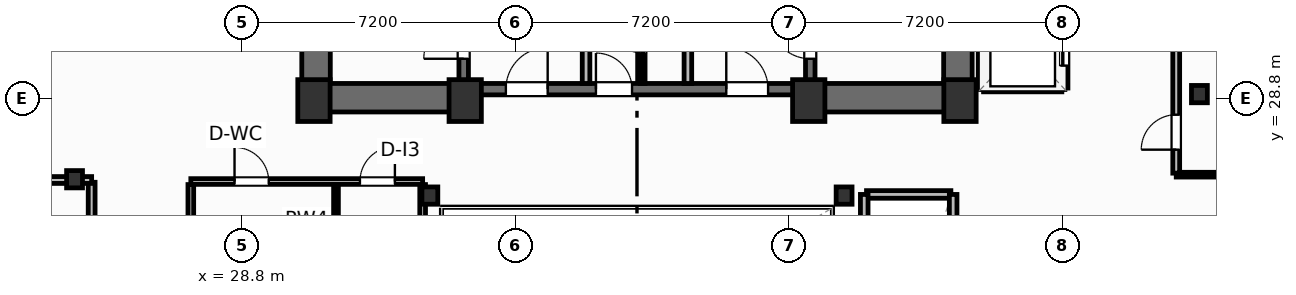
"""IFC4 building model, lengths in metres.
Left out: names, types, materials, properties, quantities, classifications, styles, units other than length and angle.
Written with IfcOpenShell. Run it as: python <this file> out.ifc"""

import sys

from ifc_helpers import new_model, si_unit, direction, frame, frame_2d, origin, origin_2d, place, context, subcontext, project, spatial, rectangle, i_section, extrude, element, fill, save


model = new_model("IFC4")
c1 = context("Model", 3, precision=1e-05, world=origin(), true_north=direction((0.0, 1.0)))
c2 = subcontext(c1, "Body", "Model", "MODEL_VIEW")
j1 = project(units=[si_unit("LENGTHUNIT", "METRE"), si_unit("PLANEANGLEUNIT", "RADIAN")], contexts=[c1])
p1 = place(None, origin())
s1 = spatial("IfcSite", under=j1, at=p1, CompositionType="ELEMENT")
p2 = place(p1, origin())
s2 = spatial("IfcBuilding", under=s1, at=p2, CompositionType="ELEMENT")
p3 = place(p2, frame((0.0, 0.0, 147.6)))
s3 = spatial("IfcBuildingStorey", under=s2, at=p3, CompositionType="ELEMENT", Elevation=147.6)
for number, where, z_axis, x_axis in (
    (1, (30.7, 28.75, 0.0), (0.0, 0.0, 1.0), (1.0, 0.0, 0.0)),
    (2, (34.68, 28.75, 0.0), (0.0, 0.0, 1.0), (1.0, 0.0, 0.0)),
    (3, (43.72, 28.75, 0.0), (0.0, 0.0, 1.0), (1.0, 0.0, 0.0)),
    (4, (47.7, 28.75, 0.0), (0.0, 0.0, 1.0), (1.0, 0.0, 0.0)),
):
    element("IfcColumn", number, at=place(p3, frame(where, z_axis=z_axis, x_axis=x_axis)), inside=s3, PredefinedType="COLUMN", context=c2, shape_type="SweptSolid", body=[
        extrude(rectangle(XDim=0.85, YDim=1.1, at=origin_2d()), origin(), (0.0, 0.0, 1.0), 3.7),
    ])
for number, where, z_axis, x_axis in (
    (5, (33.75, 26.25, 0.0), (0.0, 0.0, 1.0), (1.0, 0.0, 0.0)),
    (6, (44.65, 26.25, 0.0), (0.0, 0.0, 1.0), (1.0, 0.0, 0.0)),
    (7, (24.4, 26.68, 0.0), (0.0, 0.0, 1.0), (1.0, 0.0, 0.0)),
    (8, (54.0, 28.92, 0.0), (0.0, 0.0, 1.0), (1.0, 0.0, 0.0)),
):
    element("IfcColumn", number, at=place(p3, frame(where, z_axis=z_axis, x_axis=x_axis)), inside=s3, PredefinedType="COLUMN", context=c2, shape_type="SweptSolid", body=[
        extrude(i_section(OverallWidth=0.418, OverallDepth=0.455, WebThickness=0.042, FlangeThickness=0.068, FilletRadius=0.025, at=origin_2d()), origin(), (0.0, 0.0, 1.0), 3.7),
    ])
for number, where, z_axis, x_axis in (
    (9, (30.755, 29.2, 0.0), (0.0, 0.0, 1.0), (0.0, 1.0, 0.0)),
    (10, (47.645, 29.2, 0.0), (0.0, 0.0, 1.0), (0.0, 1.0, 0.0)),
):
    element("IfcWall", number, at=place(p3, frame(where, z_axis=z_axis, x_axis=x_axis)), inside=s3, PredefinedType="SHEAR", context=c2, shape_type="SweptSolid", body=[
        extrude(rectangle(XDim=9.22, YDim=0.75, at=frame_2d((4.61, 0.0))), origin(), (0.0, 0.0, 1.0), 3.45),
    ])
p4 = place(p3, frame((30.38, 28.825, 0.0), z_axis=(0.0, 0.0, 1.0), x_axis=(1.0, 0.0, 0.0)))
e11 = element("IfcWall", 11, at=p4, inside=s3, PredefinedType="SHEAR", context=c2, shape_type="SweptSolid", body=[
    extrude(rectangle(XDim=4.42, YDim=0.75, at=frame_2d((2.21, 0.0))), origin(), (0.0, 0.0, 1.0), 3.45),
])
p5 = place(p3, frame((43.6, 28.825, 0.0), z_axis=(0.0, 0.0, 1.0), x_axis=(1.0, 0.0, 0.0)))
e12 = element("IfcWall", 12, at=p5, inside=s3, PredefinedType="SHEAR", context=c2, shape_type="SweptSolid", body=[
    extrude(rectangle(XDim=4.42, YDim=0.75, at=frame_2d((2.21, 0.0))), origin(), (0.0, 0.0, 1.0), 3.45),
])
p6 = place(p3, frame((34.8, 29.05, 0.0), z_axis=(0.0, 0.0, 1.0), x_axis=(1.0, 0.0, 0.0)))
e13 = element("IfcWall", 13, at=p6, inside=s3, PredefinedType="SHEAR", context=c2, shape_type="SweptSolid", body=[
    extrude(rectangle(XDim=8.8, YDim=0.3, at=frame_2d((4.4, 0.0))), origin(), (0.0, 0.0, 1.0), 3.45),
])
p7 = place(p6, frame((0.95, 0.0, 0.0)))
e14 = element("IfcOpeningElement", 14, at=p7, cuts=e13, PredefinedType="OPENING", context=c2, shape_type="SweptSolid", body=[
    extrude(rectangle(XDim=1.1, YDim=2.15, at=frame_2d((0.55, 1.075))), frame((0.0, 0.16, 0.0), z_axis=(0.0, -1.0, 0.0), x_axis=(1.0, 0.0, 0.0)), (0.0, 0.0, 1.0), 0.32),
])
p8 = place(p6, frame((6.75, 0.0, 0.0)))
e15 = element("IfcOpeningElement", 15, at=p8, cuts=e13, PredefinedType="OPENING", context=c2, shape_type="SweptSolid", body=[
    extrude(rectangle(XDim=1.1, YDim=2.15, at=frame_2d((0.55, 1.075))), frame((0.0, 0.16, 0.0), z_axis=(0.0, -1.0, 0.0), x_axis=(1.0, 0.0, 0.0)), (0.0, 0.0, 1.0), 0.32),
])
p9 = place(p6, frame((3.32, 0.0, 0.0)))
e16 = element("IfcOpeningElement", 16, at=p9, cuts=e13, PredefinedType="OPENING", context=c2, shape_type="SweptSolid", body=[
    extrude(rectangle(XDim=0.95, YDim=2.15, at=frame_2d((0.475, 1.075))), frame((0.0, 0.16, 0.0), z_axis=(0.0, -1.0, 0.0), x_axis=(1.0, 0.0, 0.0)), (0.0, 0.0, 1.0), 0.32),
])
p10 = place(p3, frame((34.64, 29.2, 0.0), z_axis=(0.0, 0.0, 1.0), x_axis=(0.0, 1.0, 0.0)))
e17 = element("IfcWall", 17, at=p10, inside=s3, PredefinedType="SHEAR", context=c2, shape_type="SweptSolid", body=[
    extrude(rectangle(XDim=9.22, YDim=0.25, at=frame_2d((4.61, 0.0))), origin(), (0.0, 0.0, 1.0), 3.45),
])
p11 = place(p10, frame((0.65, 0.0, 0.0)))
e18 = element("IfcOpeningElement", 18, at=p11, cuts=e17, PredefinedType="OPENING", context=c2, shape_type="SweptSolid", body=[
    extrude(rectangle(XDim=1.05, YDim=2.15, at=frame_2d((0.525, 1.075))), frame((0.0, 0.135, 0.0), z_axis=(0.0, -1.0, 0.0), x_axis=(1.0, 0.0, 0.0)), (0.0, 0.0, 1.0), 0.27),
])
p12 = place(p3, frame((43.76, 29.2, 0.0), z_axis=(0.0, 0.0, 1.0), x_axis=(0.0, 1.0, 0.0)))
e19 = element("IfcWall", 19, at=p12, inside=s3, PredefinedType="SHEAR", context=c2, shape_type="SweptSolid", body=[
    extrude(rectangle(XDim=9.22, YDim=0.25, at=frame_2d((4.61, 0.0))), origin(), (0.0, 0.0, 1.0), 3.45),
])
p13 = place(p12, frame((0.65, 0.0, 0.0)))
e20 = element("IfcOpeningElement", 20, at=p13, cuts=e19, PredefinedType="OPENING", context=c2, shape_type="SweptSolid", body=[
    extrude(rectangle(XDim=1.05, YDim=2.15, at=frame_2d((0.525, 1.075))), frame((0.0, 0.135, 0.0), z_axis=(0.0, -1.0, 0.0), x_axis=(1.0, 0.0, 0.0)), (0.0, 0.0, 1.0), 0.27),
])
p14 = place(p3, frame((24.85, 23.03, 0.0), z_axis=(0.0, 0.0, 1.0), x_axis=(0.0, 1.0, 0.0)))
e21 = element("IfcWall", 21, at=p14, inside=s3, PredefinedType="PARTITIONING", context=c2, shape_type="SweptSolid", body=[
    extrude(rectangle(XDim=3.57, YDim=0.18, at=frame_2d((1.785, 0.0))), origin(), (0.0, 0.0, 1.0), 3.45),
])
p15 = place(p14, frame((1.5, 0.0, 0.0)))
e22 = element("IfcOpeningElement", 22, at=p15, cuts=e21, PredefinedType="OPENING", context=c2, shape_type="SweptSolid", body=[
    extrude(rectangle(XDim=0.92, YDim=2.05, at=frame_2d((0.46, 1.025))), frame((0.0, 0.1, 0.0), z_axis=(0.0, -1.0, 0.0), x_axis=(1.0, 0.0, 0.0)), (0.0, 0.0, 1.0), 0.2),
])
p16 = place(p3, frame((2.073, 26.66, 0.0), z_axis=(0.0, 0.0, 1.0), x_axis=(1.0, 0.0, 0.0)))
e23 = element("IfcWall", 23, at=p16, inside=s3, PredefinedType="PARTITIONING", context=c2, shape_type="SweptSolid", body=[
    extrude(rectangle(XDim=22.777, YDim=0.18, at=frame_2d((11.388, 0.0))), origin(), (0.0, 0.0, 1.0), 2.662),
])
p17 = place(p3, frame((53.39, 26.8, 0.0), z_axis=(0.0, 0.0, 1.0), x_axis=(1.0, 0.0, 0.0)))
e24 = element("IfcWall", 24, at=p17, inside=s3, PredefinedType="PARTITIONING", context=c2, shape_type="SweptSolid", body=[
    extrude(rectangle(XDim=23.283, YDim=0.125, at=frame_2d((11.642, 0.0))), origin(), (0.0, 0.0, 1.0), 3.45),
])
p18 = place(p3, frame((53.39, 26.84, 0.0), z_axis=(0.0, 0.0, 1.0), x_axis=(0.0, 1.0, 0.0)))
e25 = element("IfcWall", 25, at=p18, inside=s3, PredefinedType="PARTITIONING", context=c2, shape_type="SweptSolid", body=[
    extrude(rectangle(XDim=12.46, YDim=0.18, at=frame_2d((6.23, 0.0))), origin(), (0.0, 0.0, 1.0), 3.45),
])
p19 = place(p18, frame((0.618, 0.0, 0.0)))
e26 = element("IfcOpeningElement", 26, at=p19, cuts=e25, PredefinedType="OPENING", context=c2, shape_type="SweptSolid", body=[
    extrude(rectangle(XDim=0.92, YDim=2.05, at=frame_2d((0.46, 1.025))), frame((0.0, 0.1, 0.0), z_axis=(0.0, -1.0, 0.0), x_axis=(1.0, 0.0, 0.0)), (0.0, 0.0, 1.0), 0.2),
])
for number, where, z_axis, x_axis in (
    (27, (37.86, 29.2, 0.0), (0.0, 0.0, 1.0), (0.0, 1.0, 0.0)),
    (28, (40.54, 29.2, 0.0), (0.0, 0.0, 1.0), (0.0, 1.0, 0.0)),
):
    element("IfcWall", number, at=place(p3, frame(where, z_axis=z_axis, x_axis=x_axis)), inside=s3, PredefinedType="PARTITIONING", context=c2, shape_type="SweptSolid", body=[
        extrude(rectangle(XDim=5.18, YDim=0.2, at=frame_2d((2.59, 0.0))), origin(), (0.0, 0.0, 1.0), 3.45),
    ])
p20 = place(p3, frame((39.35, 29.2, 0.0), z_axis=(0.0, 0.0, 1.0), x_axis=(0.0, 1.0, 0.0)))
e29 = element("IfcWall", 29, at=p20, inside=s3, PredefinedType="PARTITIONING", context=c2, shape_type="SweptSolid", body=[
    extrude(rectangle(XDim=5.22, YDim=0.125, at=frame_2d((2.61, 0.0))), origin(), (0.0, 0.0, 1.0), 3.45),
])
p21 = place(p20, frame((0.8, 0.0, 0.0)))
e30 = element("IfcOpeningElement", 30, at=p21, cuts=e29, PredefinedType="OPENING", context=c2, shape_type="SweptSolid", body=[
    extrude(rectangle(XDim=0.85, YDim=2.05, at=frame_2d((0.425, 1.025))), frame((0.0, 0.073, 0.0), z_axis=(0.0, -1.0, 0.0), x_axis=(1.0, 0.0, 0.0)), (0.0, 0.0, 1.0), 0.145),
])
p22 = place(p20, frame((3.4, 0.0, 0.0)))
e31 = element("IfcOpeningElement", 31, at=p22, cuts=e29, PredefinedType="OPENING", context=c2, shape_type="SweptSolid", body=[
    extrude(rectangle(XDim=0.85, YDim=2.05, at=frame_2d((0.425, 1.025))), frame((0.0, 0.073, 0.0), z_axis=(0.0, -1.0, 0.0), x_axis=(1.0, 0.0, 0.0)), (0.0, 0.0, 1.0), 0.145),
])
p23 = place(p3, frame((27.46, 26.62, 0.0), z_axis=(0.0, 0.0, 1.0), x_axis=(1.0, 0.0, 0.0)))
e32 = element("IfcWall", 32, at=p23, inside=s3, PredefinedType="PARTITIONING", context=c2, shape_type="SweptSolid", body=[
    extrude(rectangle(XDim=6.1, YDim=0.15, at=frame_2d((3.05, 0.0))), origin(), (0.0, 0.0, 1.0), 2.662),
])
p24 = place(p23, frame((1.15, 0.0, 0.0)))
e33 = element("IfcOpeningElement", 33, at=p24, cuts=e32, PredefinedType="OPENING", context=c2, shape_type="SweptSolid", body=[
    extrude(rectangle(XDim=0.9, YDim=2.05, at=frame_2d((0.45, 1.025))), frame((0.0, 0.085, 0.0), z_axis=(0.0, -1.0, 0.0), x_axis=(1.0, 0.0, 0.0)), (0.0, 0.0, 1.0), 0.17),
])
p25 = place(p23, frame((4.45, 0.0, 0.0)))
e34 = element("IfcOpeningElement", 34, at=p25, cuts=e32, PredefinedType="OPENING", context=c2, shape_type="SweptSolid", body=[
    extrude(rectangle(XDim=0.92, YDim=2.05, at=frame_2d((0.46, 1.025))), frame((0.0, 0.085, 0.0), z_axis=(0.0, -1.0, 0.0), x_axis=(1.0, 0.0, 0.0)), (0.0, 0.0, 1.0), 0.17),
])
p26 = place(p3, frame((31.28, 19.38, 0.0), z_axis=(0.0, 0.0, 1.0), x_axis=(0.0, 1.0, 0.0)))
e35 = element("IfcWall", 35, at=p26, inside=s3, PredefinedType="PARTITIONING", context=c2, shape_type="SweptSolid", body=[
    extrude(rectangle(XDim=7.16, YDim=0.125, at=frame_2d((3.58, 0.0))), origin(), (0.0, 0.0, 1.0), 3.45),
])
p27 = place(p3, frame((27.46, 19.38, 0.0), z_axis=(0.0, 0.0, 1.0), x_axis=(0.0, 1.0, 0.0)))
e36 = element("IfcWall", 36, at=p27, inside=s3, PredefinedType="PARTITIONING", context=c2, shape_type="SweptSolid", body=[
    extrude(rectangle(XDim=7.16, YDim=0.15, at=frame_2d((3.58, 0.0))), origin(), (0.0, 0.0, 1.0), 3.45),
])
p28 = place(p27, frame((1.4, 0.0, 0.0)))
e37 = element("IfcOpeningElement", 37, at=p28, cuts=e36, PredefinedType="OPENING", context=c2, shape_type="SweptSolid", body=[
    extrude(rectangle(XDim=0.95, YDim=2.05, at=frame_2d((0.475, 1.025))), frame((0.0, 0.085, 0.0), z_axis=(0.0, -1.0, 0.0), x_axis=(1.0, 0.0, 0.0)), (0.0, 0.0, 1.0), 0.17),
])
p29 = place(p3, frame((33.56, 19.38, 0.0), z_axis=(0.0, 0.0, 1.0), x_axis=(0.0, 1.0, 0.0)))
e38 = element("IfcWall", 38, at=p29, inside=s3, PredefinedType="PARTITIONING", context=c2, shape_type="SweptSolid", body=[
    extrude(rectangle(XDim=7.16, YDim=0.15, at=frame_2d((3.58, 0.0))), origin(), (0.0, 0.0, 1.0), 2.824),
])
p30 = place(p3, frame((48.32, 29.08, 0.0), z_axis=(0.0, 0.0, 1.0), x_axis=(1.0, 0.0, 0.0)))
e39 = element("IfcWall", 39, at=p30, inside=s3, PredefinedType="PARTITIONING", context=c2, shape_type="SweptSolid", body=[
    extrude(rectangle(XDim=2.06, YDim=0.2, at=frame_2d((1.03, 0.0))), origin(), (0.0, 0.0, 1.0), 2.662),
])
p31 = place(p3, frame((48.28, 29.08, 0.0), z_axis=(0.0, 0.0, 1.0), x_axis=(0.0, 1.0, 0.0)))
e40 = element("IfcWall", 40, at=p31, inside=s3, PredefinedType="PARTITIONING", context=c2, shape_type="SweptSolid", body=[
    extrude(rectangle(XDim=6.89, YDim=0.2, at=frame_2d((3.445, 0.0))), origin(), (0.0, 0.0, 1.0), 3.45),
])
p32 = place(p3, frame((50.44, 29.08, 0.0), z_axis=(0.0, 0.0, 1.0), x_axis=(0.0, 1.0, 0.0)))
e41 = element("IfcWall", 41, at=p32, inside=s3, PredefinedType="PARTITIONING", context=c2, shape_type="SweptSolid", body=[
    extrude(rectangle(XDim=6.89, YDim=0.2, at=frame_2d((3.445, 0.0))), origin(), (0.0, 0.0, 1.0), 3.45),
])
p33 = place(p32, frame((0.59, 0.0, 0.0)))
e42 = element("IfcOpeningElement", 42, at=p33, cuts=e41, PredefinedType="OPENING", context=c2, shape_type="SweptSolid", body=[
    extrude(rectangle(XDim=1.1, YDim=2.15, at=frame_2d((0.55, 1.075))), frame((0.0, 0.11, 0.0), z_axis=(0.0, -1.0, 0.0), x_axis=(1.0, 0.0, 0.0)), (0.0, 0.0, 1.0), 0.22),
])
p34 = place(p32, frame((2.89, 0.0, 0.0)))
e43 = element("IfcOpeningElement", 43, at=p34, cuts=e41, PredefinedType="OPENING", context=c2, shape_type="SweptSolid", body=[
    extrude(rectangle(XDim=1.1, YDim=2.15, at=frame_2d((0.55, 1.075))), frame((0.0, 0.11, 0.0), z_axis=(0.0, -1.0, 0.0), x_axis=(1.0, 0.0, 0.0)), (0.0, 0.0, 1.0), 0.22),
])
p35 = place(p32, frame((5.19, 0.0, 0.0)))
e44 = element("IfcOpeningElement", 44, at=p35, cuts=e41, PredefinedType="OPENING", context=c2, shape_type="SweptSolid", body=[
    extrude(rectangle(XDim=1.1, YDim=2.15, at=frame_2d((0.55, 1.075))), frame((0.0, 0.11, 0.0), z_axis=(0.0, -1.0, 0.0), x_axis=(1.0, 0.0, 0.0)), (0.0, 0.0, 1.0), 0.22),
])
p36 = place(p3, frame((45.24, 26.28, 0.0), z_axis=(0.0, 0.0, 1.0), x_axis=(1.0, 0.0, 0.0)))
e45 = element("IfcWall", 45, at=p36, inside=s3, PredefinedType="PARTITIONING", context=c2, shape_type="SweptSolid", body=[
    extrude(rectangle(XDim=2.22, YDim=0.2, at=frame_2d((1.11, 0.0))), origin(), (0.0, 0.0, 1.0), 3.45),
])
for number, where, z_axis, x_axis in (
    (46, (45.18, 19.38, 0.0), (0.0, 0.0, 1.0), (0.0, 1.0, 0.0)),
    (47, (47.52, 19.38, 0.0), (0.0, 0.0, 1.0), (0.0, 1.0, 0.0)),
):
    element("IfcWall", number, at=place(p3, frame(where, z_axis=z_axis, x_axis=x_axis)), inside=s3, PredefinedType="PARTITIONING", context=c2, shape_type="SweptSolid", body=[
        extrude(rectangle(XDim=6.9, YDim=0.2, at=frame_2d((3.45, 0.0))), origin(), (0.0, 0.0, 1.0), 3.45),
    ])
p37 = place(p19, origin())
e48 = element("IfcDoor", 48, at=p37, inside=s3, OperationType="SINGLE_SWING_LEFT", PredefinedType="DOOR", context=c2, shape_type="SweptSolid", body=[
    extrude(rectangle(XDim=0.92, YDim=2.05, at=frame_2d((0.46, 1.025))), frame((0.0, 0.025, 0.0), z_axis=(0.0, -1.0, 0.0), x_axis=(1.0, 0.0, 0.0)), (0.0, 0.0, 1.0), 0.05),
])
fill(e26, e48)
p38 = place(p11, origin())
e49 = element("IfcDoor", 49, at=p38, inside=s3, OperationType="SINGLE_SWING_LEFT", PredefinedType="DOOR", context=c2, shape_type="SweptSolid", body=[
    extrude(rectangle(XDim=1.05, YDim=2.15, at=frame_2d((0.525, 1.075))), frame((0.0, 0.025, 0.0), z_axis=(0.0, -1.0, 0.0), x_axis=(1.0, 0.0, 0.0)), (0.0, 0.0, 1.0), 0.05),
])
fill(e18, e49)
p39 = place(p13, origin())
e50 = element("IfcDoor", 50, at=p39, inside=s3, OperationType="SINGLE_SWING_RIGHT", PredefinedType="DOOR", context=c2, shape_type="SweptSolid", body=[
    extrude(rectangle(XDim=1.05, YDim=2.15, at=frame_2d((0.525, 1.075))), frame((0.0, 0.025, 0.0), z_axis=(0.0, -1.0, 0.0), x_axis=(1.0, 0.0, 0.0)), (0.0, 0.0, 1.0), 0.05),
])
fill(e20, e50)
p40 = place(p7, origin())
e51 = element("IfcDoor", 51, at=p40, inside=s3, OperationType="SINGLE_SWING_RIGHT", PredefinedType="DOOR", context=c2, shape_type="SweptSolid", body=[
    extrude(rectangle(XDim=1.1, YDim=2.15, at=frame_2d((0.55, 1.075))), frame((0.0, 0.025, 0.0), z_axis=(0.0, -1.0, 0.0), x_axis=(1.0, 0.0, 0.0)), (0.0, 0.0, 1.0), 0.05),
])
fill(e14, e51)
p41 = place(p8, origin())
e52 = element("IfcDoor", 52, at=p41, inside=s3, OperationType="SINGLE_SWING_LEFT", PredefinedType="DOOR", context=c2, shape_type="SweptSolid", body=[
    extrude(rectangle(XDim=1.1, YDim=2.15, at=frame_2d((0.55, 1.075))), frame((0.0, 0.025, 0.0), z_axis=(0.0, -1.0, 0.0), x_axis=(1.0, 0.0, 0.0)), (0.0, 0.0, 1.0), 0.05),
])
fill(e15, e52)
p42 = place(p21, origin())
e53 = element("IfcDoor", 53, at=p42, inside=s3, OperationType="SINGLE_SWING_RIGHT", PredefinedType="DOOR", context=c2, shape_type="SweptSolid", body=[
    extrude(rectangle(XDim=0.85, YDim=2.05, at=frame_2d((0.425, 1.025))), frame((0.0, 0.025, 0.0), z_axis=(0.0, -1.0, 0.0), x_axis=(1.0, 0.0, 0.0)), (0.0, 0.0, 1.0), 0.05),
])
fill(e30, e53)
p43 = place(p9, origin())
e54 = element("IfcDoor", 54, at=p43, inside=s3, OperationType="SINGLE_SWING_LEFT", PredefinedType="DOOR", context=c2, shape_type="SweptSolid", body=[
    extrude(rectangle(XDim=0.95, YDim=2.15, at=frame_2d((0.475, 1.075))), frame((0.0, 0.025, 0.0), z_axis=(0.0, -1.0, 0.0), x_axis=(1.0, 0.0, 0.0)), (0.0, 0.0, 1.0), 0.05),
])
fill(e16, e54)
p44 = place(p24, origin())
e55 = element("IfcDoor", 55, at=p44, inside=s3, OperationType="SINGLE_SWING_LEFT", PredefinedType="DOOR", context=c2, shape_type="SweptSolid", body=[
    extrude(rectangle(XDim=0.9, YDim=2.05, at=frame_2d((0.45, 1.025))), frame((0.0, 0.025, 0.0), z_axis=(0.0, -1.0, 0.0), x_axis=(1.0, 0.0, 0.0)), (0.0, 0.0, 1.0), 0.05),
])
fill(e33, e55)
p45 = place(p25, origin())
e56 = element("IfcDoor", 56, at=p45, inside=s3, OperationType="SINGLE_SWING_RIGHT", PredefinedType="DOOR", context=c2, shape_type="SweptSolid", body=[
    extrude(rectangle(XDim=0.92, YDim=2.05, at=frame_2d((0.46, 1.025))), frame((0.0, 0.025, 0.0), z_axis=(0.0, -1.0, 0.0), x_axis=(1.0, 0.0, 0.0)), (0.0, 0.0, 1.0), 0.05),
])
fill(e34, e56)
p46 = place(p33, origin())
e57 = element("IfcDoor", 57, at=p46, inside=s3, OperationType="SLIDING_TO_LEFT", PredefinedType="DOOR", context=c2, shape_type="SweptSolid", body=[
    extrude(rectangle(XDim=1.1, YDim=2.15, at=frame_2d((0.55, 1.075))), frame((0.0, 0.025, 0.0), z_axis=(0.0, -1.0, 0.0), x_axis=(1.0, 0.0, 0.0)), (0.0, 0.0, 1.0), 0.05),
])
fill(e42, e57)
save(model, sys.argv[1])
